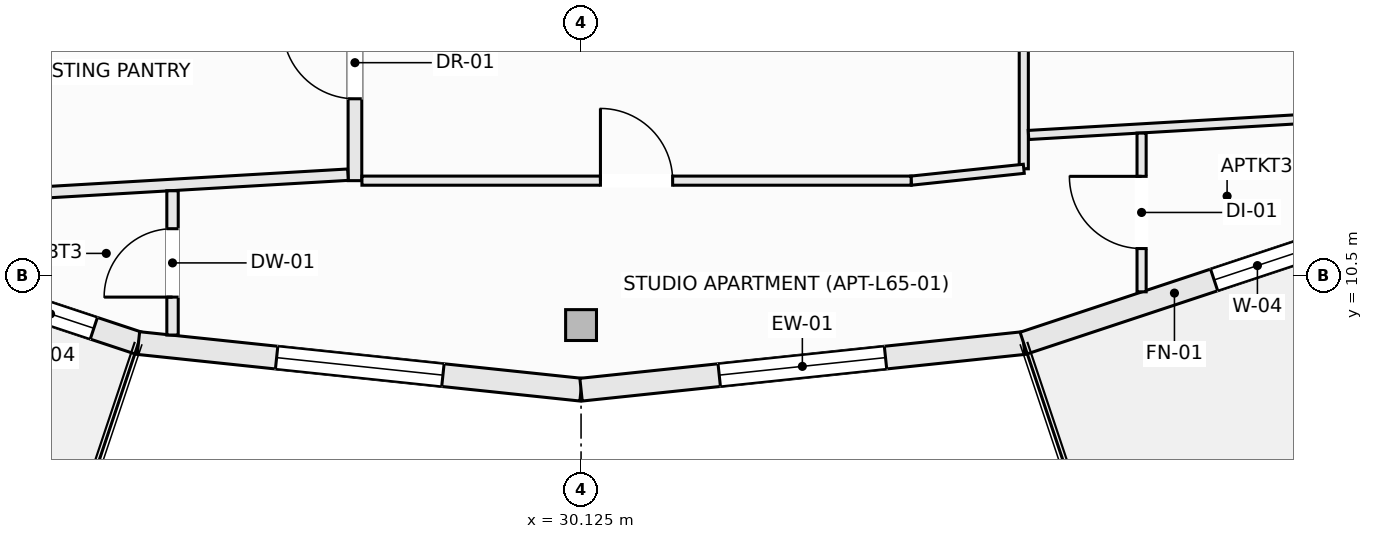
"""IFC4 building model, lengths in metres.
Left out: names, types, materials, properties, quantities, classifications, styles, units other than length and angle.
Written with IfcOpenShell. Run it as: python <this file> out.ifc"""

import sys

from ifc_helpers import new_model, si_unit, direction, frame, frame_2d, origin, origin_2d, place, context, subcontext, project, spatial, rectangle, hollow_rectangle, extrude, element, fill, save


model = new_model("IFC4")
c1 = context("Model", 3, precision=1e-05, world=origin(), true_north=direction((0.0, 1.0)))
c2 = subcontext(c1, "Body", "Model", "MODEL_VIEW")
j1 = project(units=[si_unit("LENGTHUNIT", "METRE"), si_unit("PLANEANGLEUNIT", "RADIAN")], contexts=[c1])
p1 = place(None, origin())
s1 = spatial("IfcSite", under=j1, at=p1, CompositionType="ELEMENT")
p2 = place(p1, origin())
s2 = spatial("IfcBuilding", under=s1, at=p2, CompositionType="ELEMENT")
p3 = place(p2, frame((0.0, 0.0, 242.6)))
s3 = spatial("IfcBuildingStorey", under=s2, at=p3, CompositionType="ELEMENT", Elevation=242.6)
p4 = place(p3, frame((30.125, 9.85, -0.27), z_axis=(0.0, 0.0, 1.0), x_axis=(1.0, 0.0, 0.0)))
e1 = element("IfcColumn", 1, at=p4, inside=s3, PredefinedType="COLUMN", context=c2, shape_type="SweptSolid", body=[
    extrude(hollow_rectangle(XDim=0.406, YDim=0.406, WallThickness=0.016, at=origin_2d()), origin(), (0.0, 0.0, 1.0), 3.3),
])
p5 = place(p3, frame((18.875, 11.412, 0.0), z_axis=(0.0, 0.0, 1.0), x_axis=(0.949232769585, -0.314574552605, 0.0)))
e2 = element("IfcWall", 2, at=p5, inside=s3, PredefinedType="SOLIDWALL", context=c2, shape_type="SweptSolid", body=[
    extrude(rectangle(XDim=5.717, YDim=0.3, at=frame_2d((2.858, 0.0))), origin(), (0.0, 0.0, 1.0), 2.605),
])
p6 = place(p5, frame((2.417, 0.0, 0.72)))
e3 = element("IfcOpeningElement", 3, at=p6, cuts=e2, PredefinedType="OPENING", context=c2, shape_type="SweptSolid", body=[
    extrude(rectangle(XDim=1.2, YDim=1.65, at=frame_2d((0.6, 0.825))), frame((0.0, 0.16, 0.0), z_axis=(0.0, -1.0, 0.0), x_axis=(1.0, 0.0, 0.0)), (0.0, 0.0, 1.0), 0.32),
])
p7 = place(p5, frame((3.898, 0.0, 0.72)))
e4 = element("IfcOpeningElement", 4, at=p7, cuts=e2, PredefinedType="OPENING", context=c2, shape_type="SweptSolid", body=[
    extrude(rectangle(XDim=1.2, YDim=1.65, at=frame_2d((0.6, 0.825))), frame((0.0, 0.16, 0.0), z_axis=(0.0, -1.0, 0.0), x_axis=(1.0, 0.0, 0.0)), (0.0, 0.0, 1.0), 0.32),
])
p8 = place(p3, frame((24.302, 9.613, 0.0), z_axis=(0.0, 0.0, 1.0), x_axis=(0.994500425783, -0.10473253132, 0.0)))
e5 = element("IfcWall", 5, at=p8, inside=s3, PredefinedType="SOLIDWALL", context=c2, shape_type="SweptSolid", body=[
    extrude(rectangle(XDim=5.856, YDim=0.3, at=frame_2d((2.928, 0.0))), origin(), (0.0, 0.0, 1.0), 2.605),
])
p9 = place(p8, frame((1.828, 0.0, 0.72)))
e6 = element("IfcOpeningElement", 6, at=p9, cuts=e5, PredefinedType="OPENING", context=c2, shape_type="SweptSolid", body=[
    extrude(rectangle(XDim=2.2, YDim=1.65, at=frame_2d((1.1, 0.825))), frame((0.0, 0.16, 0.0), z_axis=(0.0, -1.0, 0.0), x_axis=(1.0, 0.0, 0.0)), (0.0, 0.0, 1.0), 0.32),
])
p10 = place(p3, frame((30.125, 9.0, 0.0), z_axis=(0.0, 0.0, 1.0), x_axis=(0.994500425783, 0.10473253132, 0.0)))
e7 = element("IfcWall", 7, at=p10, inside=s3, PredefinedType="SOLIDWALL", context=c2, shape_type="SweptSolid", body=[
    extrude(rectangle(XDim=5.856, YDim=0.3, at=frame_2d((2.928, 0.0))), origin(), (0.0, 0.0, 1.0), 2.605),
])
p11 = place(p10, frame((1.828, 0.0, 0.72)))
e8 = element("IfcOpeningElement", 8, at=p11, cuts=e7, PredefinedType="OPENING", context=c2, shape_type="SweptSolid", body=[
    extrude(rectangle(XDim=2.2, YDim=1.65, at=frame_2d((1.1, 0.825))), frame((0.0, 0.16, 0.0), z_axis=(0.0, -1.0, 0.0), x_axis=(1.0, 0.0, 0.0)), (0.0, 0.0, 1.0), 0.32),
])
p12 = place(p3, frame((35.948, 9.613, 0.0), z_axis=(0.0, 0.0, 1.0), x_axis=(0.949232769585, 0.314574552605, 0.0)))
e9 = element("IfcWall", 9, at=p12, inside=s3, PredefinedType="SOLIDWALL", context=c2, shape_type="SweptSolid", body=[
    extrude(rectangle(XDim=5.717, YDim=0.3, at=frame_2d((2.858, 0.0))), origin(), (0.0, 0.0, 1.0), 2.605),
])
p13 = place(p12, frame((2.64, 0.0, 0.72)))
e10 = element("IfcOpeningElement", 10, at=p13, cuts=e9, PredefinedType="OPENING", context=c2, shape_type="SweptSolid", body=[
    extrude(rectangle(XDim=1.2, YDim=1.65, at=frame_2d((0.6, 0.825))), frame((0.0, 0.16, 0.0), z_axis=(0.0, -1.0, 0.0), x_axis=(1.0, 0.0, 0.0)), (0.0, 0.0, 1.0), 0.32),
])
for number, where, z_axis, x_axis in (
    (11, (16.862, 8.692, 0.0), (0.0, 0.0, 1.0), (0.941, -0.338, 0.0)),
    (12, (36.982, 6.392, 0.0), (0.0, 0.0, 1.0), (0.941, 0.338, 0.0)),
):
    element("IfcWall", number, at=place(p3, frame(where, z_axis=z_axis, x_axis=x_axis)), inside=s3, PredefinedType="PARAPET", context=c2, shape_type="SweptSolid", body=[
        extrude(rectangle(XDim=6.807, YDim=0.22, at=frame_2d((3.403, 0.0))), origin(), (0.0, 0.0, 1.0), 0.52),
    ])
p14 = place(p3, frame((27.15, 11.75, 0.0), z_axis=(0.0, 0.0, 1.0), x_axis=(0.0, 1.0, 0.0)))
e13 = element("IfcWall", 13, at=p14, inside=s3, PredefinedType="SOLIDWALL", context=c2, shape_type="SweptSolid", body=[
    extrude(rectangle(XDim=5.208, YDim=0.18, at=frame_2d((2.604, 0.0))), origin(), (0.0, 0.0, 1.0), 3.03),
])
p15 = place(p14, frame((3.269, 0.0, 0.0)))
e14 = element("IfcOpeningElement", 14, at=p15, cuts=e13, PredefinedType="OPENING", context=c2, shape_type="SweptSolid", body=[
    extrude(rectangle(XDim=0.95, YDim=2.1, at=frame_2d((0.475, 1.05))), frame((0.0, 0.1, 0.0), z_axis=(0.0, -1.0, 0.0), x_axis=(1.0, 0.0, 0.0)), (0.0, 0.0, 1.0), 0.2),
])
p16 = place(p14, frame((1.077, 0.0, 0.0)))
e15 = element("IfcOpeningElement", 15, at=p16, cuts=e13, PredefinedType="OPENING", context=c2, shape_type="SweptSolid", body=[
    extrude(rectangle(XDim=0.95, YDim=2.1, at=frame_2d((0.475, 1.05))), frame((0.0, 0.1, 0.0), z_axis=(0.0, -1.0, 0.0), x_axis=(1.0, 0.0, 0.0)), (0.0, 0.0, 1.0), 0.2),
])
p17 = place(p3, frame((35.95, 11.906, 0.0), z_axis=(0.0, 0.0, 1.0), x_axis=(0.0, 1.0, 0.0)))
e16 = element("IfcWall", 16, at=p17, inside=s3, PredefinedType="PARTITIONING", context=c2, shape_type="SweptSolid", body=[
    extrude(rectangle(XDim=3.044, YDim=0.12, at=frame_2d((1.522, 0.0))), origin(), (0.0, 0.0, 1.0), 3.03),
])
p18 = place(p3, frame((34.468, 11.75, 0.0), z_axis=(0.0, 0.0, 1.0), x_axis=(0.994504555135, 0.104693313135, 0.0)))
e17 = element("IfcWall", 17, at=p18, inside=s3, PredefinedType="PARTITIONING", context=c2, shape_type="SweptSolid", body=[
    extrude(rectangle(XDim=1.49, YDim=0.12, at=frame_2d((0.745, 0.0))), origin(), (0.0, 0.0, 1.0), 3.03),
])
p19 = place(p3, frame((27.242, 11.75, 0.0), z_axis=(0.0, 0.0, 1.0), x_axis=(1.0, 0.0, 0.0)))
e18 = element("IfcWall", 18, at=p19, inside=s3, PredefinedType="PARTITIONING", context=c2, shape_type="SweptSolid", body=[
    extrude(rectangle(XDim=7.226, YDim=0.12, at=frame_2d((3.613, 0.0))), origin(), (0.0, 0.0, 1.0), 3.03),
])
p20 = place(p19, frame((3.138, 0.0, 0.0)))
e19 = element("IfcOpeningElement", 19, at=p20, cuts=e18, PredefinedType="OPENING", context=c2, shape_type="SweptSolid", body=[
    extrude(rectangle(XDim=0.95, YDim=2.1, at=frame_2d((0.475, 1.05))), frame((0.0, 0.07, 0.0), z_axis=(0.0, -1.0, 0.0), x_axis=(1.0, 0.0, 0.0)), (0.0, 0.0, 1.0), 0.14),
])
p21 = place(p3, frame((17.698, 13.162, 0.0), z_axis=(0.0, 0.0, 1.0), x_axis=(0.990958840374, 0.134166227808, 0.0)))
e20 = element("IfcWall", 20, at=p21, inside=s3, PredefinedType="PARTITIONING", context=c2, shape_type="SweptSolid", body=[
    extrude(rectangle(XDim=9.446, YDim=0.12, at=frame_2d((4.723, 0.0))), origin(), (0.0, 0.0, 1.0), 3.03),
])
p22 = place(p3, frame((19.44, 11.384, 0.0), z_axis=(0.0, 0.0, 1.0), x_axis=(0.998303266402, 0.058228758288, 0.0)))
e21 = element("IfcWall", 21, at=p22, inside=s3, PredefinedType="PARTITIONING", context=c2, shape_type="SweptSolid", body=[
    extrude(rectangle(XDim=7.631, YDim=0.15, at=frame_2d((3.815, 0.0))), origin(), (0.0, 0.0, 1.0), 2.605),
])
p23 = place(p3, frame((36.012, 12.351, 0.0), z_axis=(0.0, 0.0, 1.0), x_axis=(0.998301967663, 0.058251020246, 0.0)))
e22 = element("IfcWall", 22, at=p23, inside=s3, PredefinedType="PARTITIONING", context=c2, shape_type="SweptSolid", body=[
    extrude(rectangle(XDim=6.199, YDim=0.12, at=frame_2d((3.099, 0.0))), origin(), (0.0, 0.0, 1.0), 2.605),
])
p24 = place(p3, frame((24.75, 9.719, 0.0), z_axis=(0.0, 0.0, 1.0), x_axis=(0.0, 1.0, 0.0)))
e23 = element("IfcWall", 23, at=p24, inside=s3, PredefinedType="PARTITIONING", context=c2, shape_type="SweptSolid", body=[
    extrude(rectangle(XDim=1.898, YDim=0.15, at=frame_2d((0.949, 0.0))), origin(), (0.0, 0.0, 1.0), 2.77),
])
p25 = place(p24, frame((0.499, 0.0, 0.0)))
e24 = element("IfcOpeningElement", 24, at=p25, cuts=e23, PredefinedType="OPENING", context=c2, shape_type="SweptSolid", body=[
    extrude(rectangle(XDim=0.9, YDim=2.1, at=frame_2d((0.45, 1.05))), frame((0.0, 0.085, 0.0), z_axis=(0.0, -1.0, 0.0), x_axis=(1.0, 0.0, 0.0)), (0.0, 0.0, 1.0), 0.17),
])
p26 = place(p3, frame((37.5, 10.288, 0.0), z_axis=(0.0, 0.0, 1.0), x_axis=(0.0, 1.0, 0.0)))
e25 = element("IfcWall", 25, at=p26, inside=s3, PredefinedType="PARTITIONING", context=c2, shape_type="SweptSolid", body=[
    extrude(rectangle(XDim=2.088, YDim=0.12, at=frame_2d((1.044, 0.0))), origin(), (0.0, 0.0, 1.0), 3.03),
])
p27 = place(p26, frame((0.569, 0.0, 0.0)))
e26 = element("IfcOpeningElement", 26, at=p27, cuts=e25, PredefinedType="OPENING", context=c2, shape_type="SweptSolid", body=[
    extrude(rectangle(XDim=0.95, YDim=2.1, at=frame_2d((0.475, 1.05))), frame((0.0, 0.07, 0.0), z_axis=(0.0, -1.0, 0.0), x_axis=(1.0, 0.0, 0.0)), (0.0, 0.0, 1.0), 0.14),
])
p28 = place(p9, origin())
e27 = element("IfcWindow", 27, at=p28, inside=s3, PartitioningType="SINGLE_PANEL", PredefinedType="WINDOW", context=c2, shape_type="SweptSolid", body=[
    extrude(rectangle(XDim=2.2, YDim=1.65, at=frame_2d((1.1, 0.825))), frame((0.0, 0.03, 0.0), z_axis=(0.0, -1.0, 0.0), x_axis=(1.0, 0.0, 0.0)), (0.0, 0.0, 1.0), 0.06),
])
fill(e6, e27)
p29 = place(p11, origin())
e28 = element("IfcWindow", 28, at=p29, inside=s3, PartitioningType="SINGLE_PANEL", PredefinedType="WINDOW", context=c2, shape_type="SweptSolid", body=[
    extrude(rectangle(XDim=2.2, YDim=1.65, at=frame_2d((1.1, 0.825))), frame((0.0, 0.03, 0.0), z_axis=(0.0, -1.0, 0.0), x_axis=(1.0, 0.0, 0.0)), (0.0, 0.0, 1.0), 0.06),
])
fill(e8, e28)
p30 = place(p13, origin())
e29 = element("IfcWindow", 29, at=p30, inside=s3, PartitioningType="SINGLE_PANEL", PredefinedType="WINDOW", context=c2, shape_type="SweptSolid", body=[
    extrude(rectangle(XDim=1.2, YDim=1.65, at=frame_2d((0.6, 0.825))), frame((0.0, 0.03, 0.0), z_axis=(0.0, -1.0, 0.0), x_axis=(1.0, 0.0, 0.0)), (0.0, 0.0, 1.0), 0.06),
])
fill(e10, e29)
p31 = place(p16, origin())
e30 = element("IfcDoor", 30, at=p31, inside=s3, OperationType="SINGLE_SWING_RIGHT", PredefinedType="DOOR", context=c2, shape_type="SweptSolid", body=[
    extrude(rectangle(XDim=0.95, YDim=2.1, at=frame_2d((0.475, 1.05))), frame((0.0, 0.025, 0.0), z_axis=(0.0, -1.0, 0.0), x_axis=(1.0, 0.0, 0.0)), (0.0, 0.0, 1.0), 0.05),
])
fill(e15, e30)
p32 = place(p20, origin())
e31 = element("IfcDoor", 31, at=p32, inside=s3, OperationType="SINGLE_SWING_LEFT", PredefinedType="DOOR", context=c2, shape_type="SweptSolid", body=[
    extrude(rectangle(XDim=0.95, YDim=2.1, at=frame_2d((0.475, 1.05))), frame((0.0, 0.025, 0.0), z_axis=(0.0, -1.0, 0.0), x_axis=(1.0, 0.0, 0.0)), (0.0, 0.0, 1.0), 0.05),
])
fill(e19, e31)
p33 = place(p27, origin())
e32 = element("IfcDoor", 32, at=p33, inside=s3, OperationType="SINGLE_SWING_RIGHT", PredefinedType="DOOR", context=c2, shape_type="SweptSolid", body=[
    extrude(rectangle(XDim=0.95, YDim=2.1, at=frame_2d((0.475, 1.05))), frame((0.0, 0.025, 0.0), z_axis=(0.0, -1.0, 0.0), x_axis=(1.0, 0.0, 0.0)), (0.0, 0.0, 1.0), 0.05),
])
fill(e26, e32)
p34 = place(p25, origin())
e33 = element("IfcDoor", 33, at=p34, inside=s3, OperationType="SINGLE_SWING_LEFT", PredefinedType="DOOR", context=c2, shape_type="SweptSolid", body=[
    extrude(rectangle(XDim=0.9, YDim=2.1, at=frame_2d((0.45, 1.05))), frame((0.0, 0.025, 0.0), z_axis=(0.0, -1.0, 0.0), x_axis=(1.0, 0.0, 0.0)), (0.0, 0.0, 1.0), 0.05),
])
fill(e24, e33)
p35 = place(p7, origin())
e34 = element("IfcWindow", 34, at=p35, inside=s3, PartitioningType="SINGLE_PANEL", PredefinedType="WINDOW", context=c2, shape_type="SweptSolid", body=[
    extrude(rectangle(XDim=1.2, YDim=1.65, at=frame_2d((0.6, 0.825))), frame((0.0, 0.03, 0.0), z_axis=(0.0, -1.0, 0.0), x_axis=(1.0, 0.0, 0.0)), (0.0, 0.0, 1.0), 0.06),
])
fill(e4, e34)
save(model, sys.argv[1])
